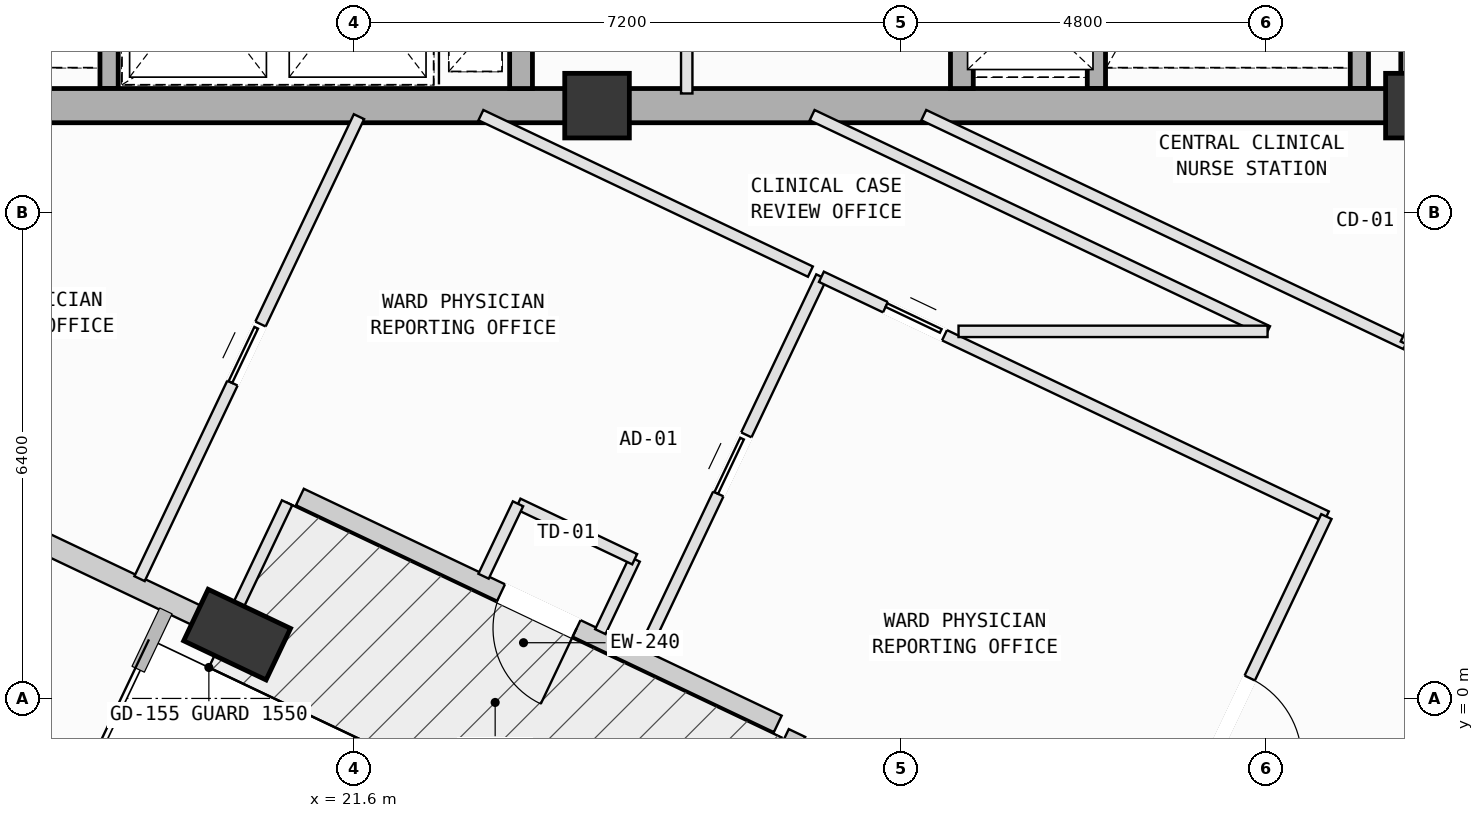
"""IFC4 building model, lengths in metres.
Left out: names, types, materials, properties, quantities, classifications, styles, units other than length and angle.
Written with IfcOpenShell. Run it as: python <this file> out.ifc"""

import sys

from ifc_helpers import new_model, si_unit, direction, frame, frame_2d, origin, origin_2d, place, context, subcontext, project, spatial, rectangle, extrude, element, fill, save


model = new_model("IFC4")
c1 = context("Model", 3, precision=1e-05, world=origin(), true_north=direction((0.0, 1.0)))
c2 = subcontext(c1, "Body", "Model", "MODEL_VIEW")
j1 = project(units=[si_unit("LENGTHUNIT", "METRE"), si_unit("PLANEANGLEUNIT", "RADIAN")], contexts=[c1])
p1 = place(None, origin())
s1 = spatial("IfcSite", under=j1, at=p1, CompositionType="ELEMENT")
p2 = place(p1, origin())
s2 = spatial("IfcBuilding", under=s1, at=p2, CompositionType="ELEMENT")
p3 = place(p2, frame((0.0, 0.0, 300.6)))
s3 = spatial("IfcBuildingStorey", under=s2, at=p3, CompositionType="ELEMENT", Elevation=300.6)
for number, where, z_axis, x_axis in (
    (1, (24.8, 7.8, 0.0), (0.0, 0.0, 1.0), (1.0, 0.0, 0.0)),
    (2, (35.6, 7.8, 0.0), (0.0, 0.0, 1.0), (1.0, 0.0, 0.0)),
):
    element("IfcColumn", number, at=place(p3, frame(where, z_axis=z_axis, x_axis=x_axis)), inside=s3, PredefinedType="COLUMN", context=c2, shape_type="SweptSolid", body=[
        extrude(rectangle(XDim=0.85, YDim=0.85, at=origin_2d()), origin(), (0.0, 0.0, 1.0), 4.0),
    ])
p4 = place(p3, frame((20.064, 0.84, 0.002), z_axis=(0.0991191026, -0.054931284662, 0.993558230536), x_axis=(-0.810633069732, -0.583533442559, 0.04860810296)))
e3 = element("IfcColumn", 3, at=p4, inside=s3, PredefinedType="COLUMN", context=c2, shape_type="SweptSolid", body=[
    extrude(rectangle(XDim=1.2, YDim=0.75, at=origin_2d()), origin(), (0.0, 0.0, 1.0), 4.022),
])
p5 = place(p3, frame((27.178, -0.335, 0.0), z_axis=(0.0, 0.0, 1.0), x_axis=(-0.903341048246, 0.428923012385, 0.0)))
e4 = element("IfcWall", 4, at=p5, inside=s3, PredefinedType="SOLIDWALL", context=c2, shape_type="SweptSolid", body=[
    extrude(rectangle(XDim=6.96, YDim=0.24, at=frame_2d((3.48, 0.0))), origin(), (0.0, 0.0, 1.0), 3.265),
])
p6 = place(p5, frame((2.93, 0.0, 0.0)))
e5 = element("IfcOpeningElement", 5, at=p6, cuts=e4, PredefinedType="OPENING", context=c2, shape_type="SweptSolid", body=[
    extrude(rectangle(XDim=1.1, YDim=2.15, at=frame_2d((0.55, 1.075))), frame((0.0, 0.13, 0.0), z_axis=(0.0, -1.0, 0.0), x_axis=(1.0, 0.0, 0.0)), (0.0, 0.0, 1.0), 0.26),
])
p7 = place(p3, frame((26.358, -2.713, 0.0), z_axis=(0.0, 0.0, 1.0), x_axis=(0.428997055532, 0.903305887474, 0.0)))
e6 = element("IfcWall", 6, at=p7, inside=s3, PredefinedType="SOLIDWALL", context=c2, shape_type="SweptSolid", body=[
    extrude(rectangle(XDim=2.5, YDim=0.24, at=frame_2d((1.25, 0.0))), origin(), (0.0, 0.0, 1.0), 3.265),
])
p8 = place(p3, frame((19.766, 0.981, 0.0), z_axis=(0.0, 0.0, 1.0), x_axis=(-0.903338909566, 0.428927516561, 0.0)))
e7 = element("IfcWall", 7, at=p8, inside=s3, PredefinedType="SOLIDWALL", context=c2, shape_type="SweptSolid", body=[
    extrude(rectangle(XDim=5.7, YDim=0.28, at=frame_2d((2.85, 0.0))), origin(), (0.0, 0.0, 1.0), 3.245),
])
p9 = place(p8, frame((2.606, 0.0, 0.75)))
e8 = element("IfcOpeningElement", 8, at=p9, cuts=e7, PredefinedType="OPENING", context=c2, shape_type="SweptSolid", body=[
    extrude(rectangle(XDim=2.0, YDim=1.95, at=frame_2d((1.0, 0.975))), frame((0.0, 0.15, 0.0), z_axis=(0.0, -1.0, 0.0), x_axis=(1.0, 0.0, 0.0)), (0.0, 0.0, 1.0), 0.3),
])
for number, where, z_axis, x_axis in (
    (9, (18.38, 15.12, 0.0), (0.0, 0.0, 1.0), (0.0, -1.0, 0.0)),
    (10, (34.83, 15.12, 0.0), (0.0, 0.0, 1.0), (0.0, -1.0, 0.0)),
    (11, (31.37, 8.025, 0.0), (0.0, 0.0, 1.0), (0.0, 1.0, 0.0)),
):
    element("IfcWall", number, at=place(p3, frame(where, z_axis=z_axis, x_axis=x_axis)), inside=s3, PredefinedType="SOLIDWALL", context=c2, shape_type="SweptSolid", body=[
        extrude(rectangle(XDim=7.095, YDim=0.24, at=frame_2d((3.548, 0.0))), origin(), (0.0, 0.0, 1.0), 3.78),
    ])
for number, where, z_axis, x_axis in (
    (12, (14.0, 7.8, 0.0), (0.0, 0.0, 1.0), (1.0, 0.0, 0.0)),
    (13, (24.8, 7.8, 0.0), (0.0, 0.0, 1.0), (1.0, 0.0, 0.0)),
):
    element("IfcWall", number, at=place(p3, frame(where, z_axis=z_axis, x_axis=x_axis)), inside=s3, PredefinedType="SHEAR", context=c2, shape_type="SweptSolid", body=[
        extrude(rectangle(XDim=10.8, YDim=0.45, at=frame_2d((5.4, 0.0))), origin(), (0.0, 0.0, 1.0), 3.78),
    ])
p10 = place(p3, frame((35.6, 7.8, 0.0), z_axis=(0.0, 0.0, 1.0), x_axis=(0.0, 1.0, 0.0)))
e14 = element("IfcWall", 14, at=p10, inside=s3, PredefinedType="SHEAR", context=c2, shape_type="SweptSolid", body=[
    extrude(rectangle(XDim=9.0, YDim=0.45, at=frame_2d((4.5, 0.0))), origin(), (0.0, 0.0, 1.0), 3.78),
])
p11 = place(p3, frame((23.8, 8.025, 0.0), z_axis=(0.0, 0.0, 1.0), x_axis=(0.0, 1.0, 0.0)))
e15 = element("IfcWall", 15, at=p11, inside=s3, PredefinedType="SOLIDWALL", context=c2, shape_type="SweptSolid", body=[
    extrude(rectangle(XDim=2.655, YDim=0.3, at=frame_2d((1.328, 0.0))), origin(), (0.0, 0.0, 1.0), 3.78),
])
p12 = place(p3, frame((29.6, 8.025, 0.0), z_axis=(0.0, 0.0, 1.0), x_axis=(0.0, 1.0, 0.0)))
e16 = element("IfcWall", 16, at=p12, inside=s3, PredefinedType="SOLIDWALL", context=c2, shape_type="SweptSolid", body=[
    extrude(rectangle(XDim=1.995, YDim=0.3, at=frame_2d((0.998, 0.0))), origin(), (0.0, 0.0, 1.0), 3.78),
])
p13 = place(p3, frame((25.98, 7.96, 0.0), z_axis=(0.0, 0.0, 1.0), x_axis=(0.0, 1.0, 0.0)))
e17 = element("IfcWall", 17, at=p13, inside=s3, PredefinedType="PARTITIONING", context=c2, shape_type="SweptSolid", body=[
    extrude(rectangle(XDim=2.54, YDim=0.15, at=frame_2d((1.27, 0.0))), origin(), (0.0, 0.0, 1.0), 3.78),
])
p14 = place(p13, frame((0.945, 0.0, 0.0)))
e18 = element("IfcOpeningElement", 18, at=p14, cuts=e17, PredefinedType="OPENING", context=c2, shape_type="SweptSolid", body=[
    extrude(rectangle(XDim=1.0, YDim=2.12, at=frame_2d((0.5, 1.06))), frame((0.0, 0.085, 0.0), z_axis=(0.0, -1.0, 0.0), x_axis=(1.0, 0.0, 0.0)), (0.0, 0.0, 1.0), 0.17),
])
p15 = place(p3, frame((33.352, -5.331, 0.0), z_axis=(0.0, 0.0, 1.0), x_axis=(0.428903895446, 0.903350125074, 0.0)))
e19 = element("IfcWall", 19, at=p15, inside=s3, PredefinedType="PARTITIONING", context=c2, shape_type="SweptSolid", body=[
    extrude(rectangle(XDim=8.24, YDim=0.15, at=frame_2d((4.12, 0.0))), origin(), (0.0, 0.0, 1.0), 3.78),
])
p16 = place(p15, frame((3.52, 0.0, 0.0)))
e20 = element("IfcOpeningElement", 20, at=p16, cuts=e19, PredefinedType="OPENING", context=c2, shape_type="SweptSolid", body=[
    extrude(rectangle(XDim=1.2, YDim=2.15, at=frame_2d((0.6, 1.075))), frame((0.0, 0.085, 0.0), z_axis=(0.0, -1.0, 0.0), x_axis=(1.0, 0.0, 0.0)), (0.0, 0.0, 1.0), 0.17),
])
p17 = place(p3, frame((25.408, 0.611, 0.0), z_axis=(0.0, 0.0, 1.0), x_axis=(0.428894613003, 0.90335453225, 0.0)))
e21 = element("IfcWall", 21, at=p17, inside=s3, PredefinedType="PARTITIONING", context=c2, shape_type="SweptSolid", body=[
    extrude(rectangle(XDim=5.465, YDim=0.15, at=frame_2d((2.732, 0.0))), origin(), (0.0, 0.0, 1.0), 3.78),
])
p18 = place(p17, frame((2.302, 0.0, 0.0)))
e22 = element("IfcOpeningElement", 22, at=p18, cuts=e21, PredefinedType="OPENING", context=c2, shape_type="SweptSolid", body=[
    extrude(rectangle(XDim=0.86, YDim=2.06, at=frame_2d((0.43, 1.03))), frame((0.0, 0.085, 0.0), z_axis=(0.0, -1.0, 0.0), x_axis=(1.0, 0.0, 0.0)), (0.0, 0.0, 1.0), 0.17),
])
p19 = place(p3, frame((27.752, 5.548, 0.0), z_axis=(0.0, 0.0, 1.0), x_axis=(0.903324453773, -0.42895795973, 0.0)))
e23 = element("IfcWall", 23, at=p19, inside=s3, PredefinedType="PARTITIONING", context=c2, shape_type="SweptSolid", body=[
    extrude(rectangle(XDim=7.355, YDim=0.15, at=frame_2d((3.677, 0.0))), origin(), (0.0, 0.0, 1.0), 3.78),
])
p20 = place(p19, frame((0.933, 0.0, 0.0)))
e24 = element("IfcOpeningElement", 24, at=p20, cuts=e23, PredefinedType="OPENING", context=c2, shape_type="SweptSolid", body=[
    extrude(rectangle(XDim=0.86, YDim=2.06, at=frame_2d((0.43, 1.03))), frame((0.0, 0.085, 0.0), z_axis=(0.0, -1.0, 0.0), x_axis=(1.0, 0.0, 0.0)), (0.0, 0.0, 1.0), 0.17),
])
p21 = place(p3, frame((34.396, 2.393, 0.0), z_axis=(0.0, 0.0, 1.0), x_axis=(-0.428891472211, -0.903356023429, 0.0)))
e25 = element("IfcWall", 25, at=p21, inside=s3, PredefinedType="PARTITIONING", context=c2, shape_type="SweptSolid", body=[
    extrude(rectangle(XDim=5.904, YDim=0.15, at=frame_2d((2.952, 0.0))), origin(), (0.0, 0.0, 1.0), 3.78),
])
p22 = place(p21, frame((2.352, 0.0, 0.0)))
e26 = element("IfcOpeningElement", 26, at=p22, cuts=e25, PredefinedType="OPENING", context=c2, shape_type="SweptSolid", body=[
    extrude(rectangle(XDim=1.2, YDim=2.15, at=frame_2d((0.6, 1.075))), frame((0.0, 0.085, 0.0), z_axis=(0.0, -1.0, 0.0), x_axis=(1.0, 0.0, 0.0)), (0.0, 0.0, 1.0), 0.17),
])
p23 = place(p3, frame((24.843, 0.879, 0.0), z_axis=(0.0, 0.0, 1.0), x_axis=(0.428414640887, 0.903582257171, 0.0)))
e27 = element("IfcWall", 27, at=p23, inside=s3, PredefinedType="PARTITIONING", context=c2, shape_type="SweptSolid", body=[
    extrude(rectangle(XDim=1.055, YDim=0.15, at=frame_2d((0.527, 0.0))), origin(), (0.0, 0.0, 1.0), 3.78),
])
p24 = place(p3, frame((25.295, 1.832, 0.0), z_axis=(0.0, 0.0, 1.0), x_axis=(-0.903295600518, 0.429018715309, 0.0)))
e28 = element("IfcWall", 28, at=p24, inside=s3, PredefinedType="PARTITIONING", context=c2, shape_type="SweptSolid", body=[
    extrude(rectangle(XDim=1.699, YDim=0.15, at=frame_2d((0.85, 0.0))), origin(), (0.0, 0.0, 1.0), 3.78),
])
p25 = place(p3, frame((23.76, 2.561, 0.0), z_axis=(0.0, 0.0, 1.0), x_axis=(-0.429358789068, -0.903134004592, 0.0)))
e29 = element("IfcWall", 29, at=p25, inside=s3, PredefinedType="PARTITIONING", context=c2, shape_type="SweptSolid", body=[
    extrude(rectangle(XDim=1.055, YDim=0.15, at=frame_2d((0.528, 0.0))), origin(), (0.0, 0.0, 1.0), 3.78),
])
p26 = place(p3, frame((20.722, 2.575, 0.0), z_axis=(0.0, 0.0, 1.0), x_axis=(-0.428807781421, -0.90339575303, 0.0)))
e30 = element("IfcWall", 30, at=p26, inside=s3, PredefinedType="PARTITIONING", context=c2, shape_type="SweptSolid", body=[
    extrude(rectangle(XDim=2.08, YDim=0.15, at=frame_2d((1.04, 0.0))), origin(), (0.0, 0.0, 1.0), 3.78),
])
p27 = place(p3, frame((18.781, 1.576, 0.0), z_axis=(0.0, 0.0, 1.0), x_axis=(0.428982814931, 0.903312650467, 0.0)))
e31 = element("IfcWall", 31, at=p27, inside=s3, PredefinedType="PARTITIONING", context=c2, shape_type="SweptSolid", body=[
    extrude(rectangle(XDim=6.73, YDim=0.15, at=frame_2d((3.365, 0.0))), origin(), (0.0, 0.0, 1.0), 3.78),
])
p28 = place(p27, frame((2.849, 0.0, 0.0)))
e32 = element("IfcOpeningElement", 32, at=p28, cuts=e31, PredefinedType="OPENING", context=c2, shape_type="SweptSolid", body=[
    extrude(rectangle(XDim=0.86, YDim=2.06, at=frame_2d((0.43, 1.03))), frame((0.0, 0.085, 0.0), z_axis=(0.0, -1.0, 0.0), x_axis=(1.0, 0.0, 0.0)), (0.0, 0.0, 1.0), 0.17),
])
p29 = place(p3, frame((23.272, 7.675, 0.0), z_axis=(0.0, 0.0, 1.0), x_axis=(0.903279475918, -0.429052663882, 0.0)))
e33 = element("IfcWall", 33, at=p29, inside=s3, PredefinedType="PARTITIONING", context=c2, shape_type="SweptSolid", body=[
    extrude(rectangle(XDim=4.799, YDim=0.15, at=frame_2d((2.399, 0.0))), origin(), (0.0, 0.0, 1.0), 3.78),
])
p30 = place(p3, frame((35.441, 4.664, 0.0), z_axis=(0.0, 0.0, 1.0), x_axis=(-0.903352966439, 0.42889791096, 0.0)))
e34 = element("IfcWall", 34, at=p30, inside=s3, PredefinedType="PARTITIONING", context=c2, shape_type="SweptSolid", body=[
    extrude(rectangle(XDim=7.02, YDim=0.15, at=frame_2d((3.51, 0.0))), origin(), (0.0, 0.0, 1.0), 3.78),
])
p31 = place(p3, frame((37.15, 8.263, 0.0), z_axis=(0.0, 0.0, 1.0), x_axis=(-0.428958064464, -0.903324404038, 0.0)))
e35 = element("IfcWall", 35, at=p31, inside=s3, PredefinedType="PARTITIONING", context=c2, shape_type="SweptSolid", body=[
    extrude(rectangle(XDim=3.984, YDim=0.15, at=frame_2d((1.992, 0.0))), origin(), (0.0, 0.0, 1.0), 3.78),
])
p32 = place(p31, frame((2.074, 0.0, 0.0)))
e36 = element("IfcOpeningElement", 36, at=p32, cuts=e35, PredefinedType="OPENING", context=c2, shape_type="SweptSolid", body=[
    extrude(rectangle(XDim=1.0, YDim=2.12, at=frame_2d((0.5, 1.06))), frame((0.0, 0.085, 0.0), z_axis=(0.0, -1.0, 0.0), x_axis=(1.0, 0.0, 0.0)), (0.0, 0.0, 1.0), 0.17),
])
p33 = place(p3, frame((27.63, 7.675, 0.0), z_axis=(0.0, 0.0, 1.0), x_axis=(0.903354516737, -0.428894645678, 0.0)))
e37 = element("IfcWall", 37, at=p33, inside=s3, PredefinedType="PARTITIONING", context=c2, shape_type="SweptSolid", body=[
    extrude(rectangle(XDim=6.633, YDim=0.15, at=frame_2d((3.317, 0.0))), origin(), (0.0, 0.0, 1.0), 3.78),
])
p34 = place(p3, frame((33.622, 4.83, 0.0), z_axis=(0.0, 0.0, 1.0), x_axis=(-1.0, 0.0, 0.0)))
e38 = element("IfcWall", 38, at=p34, inside=s3, PredefinedType="PARTITIONING", context=c2, shape_type="SweptSolid", body=[
    extrude(rectangle(XDim=4.066, YDim=0.15, at=frame_2d((2.033, 0.0))), origin(), (0.0, 0.0, 1.0), 3.78),
])
p35 = place(p6, origin())
e39 = element("IfcDoor", 39, at=p35, inside=s3, OperationType="SINGLE_SWING_LEFT", PredefinedType="DOOR", context=c2, shape_type="SweptSolid", body=[
    extrude(rectangle(XDim=1.1, YDim=2.15, at=frame_2d((0.55, 1.075))), frame((0.0, 0.025, 0.0), z_axis=(0.0, -1.0, 0.0), x_axis=(1.0, 0.0, 0.0)), (0.0, 0.0, 1.0), 0.05),
])
fill(e5, e39)
p36 = place(p22, origin())
e40 = element("IfcDoor", 40, at=p36, inside=s3, OperationType="SINGLE_SWING_RIGHT", PredefinedType="DOOR", context=c2, shape_type="SweptSolid", body=[
    extrude(rectangle(XDim=1.2, YDim=2.15, at=frame_2d((0.6, 1.075))), frame((0.0, 0.025, 0.0), z_axis=(0.0, -1.0, 0.0), x_axis=(1.0, 0.0, 0.0)), (0.0, 0.0, 1.0), 0.05),
])
fill(e26, e40)
p37 = place(p18, origin())
e41 = element("IfcDoor", 41, at=p37, inside=s3, OperationType="SLIDING_TO_LEFT", PredefinedType="DOOR", context=c2, shape_type="SweptSolid", body=[
    extrude(rectangle(XDim=0.86, YDim=2.06, at=frame_2d((0.43, 1.03))), frame((0.0, 0.025, 0.0), z_axis=(0.0, -1.0, 0.0), x_axis=(1.0, 0.0, 0.0)), (0.0, 0.0, 1.0), 0.05),
])
fill(e22, e41)
p38 = place(p20, origin())
e42 = element("IfcDoor", 42, at=p38, inside=s3, OperationType="SLIDING_TO_LEFT", PredefinedType="DOOR", context=c2, shape_type="SweptSolid", body=[
    extrude(rectangle(XDim=0.86, YDim=2.06, at=frame_2d((0.43, 1.03))), frame((0.0, 0.025, 0.0), z_axis=(0.0, -1.0, 0.0), x_axis=(1.0, 0.0, 0.0)), (0.0, 0.0, 1.0), 0.05),
])
fill(e24, e42)
p39 = place(p28, origin())
e43 = element("IfcDoor", 43, at=p39, inside=s3, OperationType="SLIDING_TO_LEFT", PredefinedType="DOOR", context=c2, shape_type="SweptSolid", body=[
    extrude(rectangle(XDim=0.86, YDim=2.06, at=frame_2d((0.43, 1.03))), frame((0.0, 0.025, 0.0), z_axis=(0.0, -1.0, 0.0), x_axis=(1.0, 0.0, 0.0)), (0.0, 0.0, 1.0), 0.05),
])
fill(e32, e43)
save(model, sys.argv[1])
